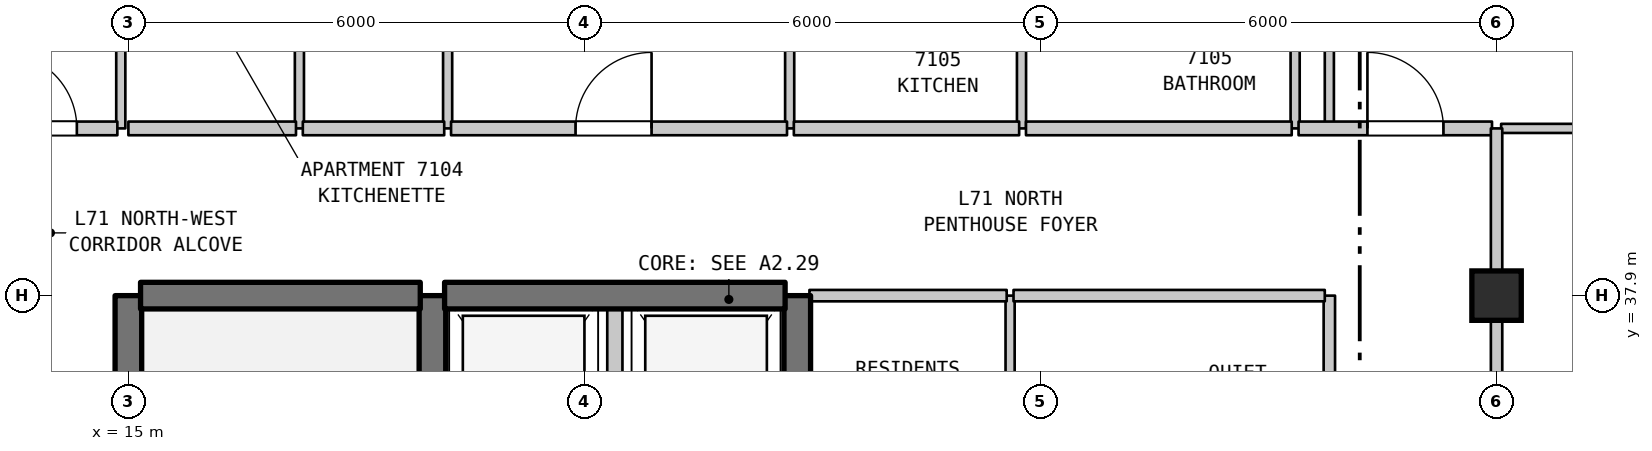
"""IFC4 building model, lengths in metres.
Left out: names, types, materials, properties, quantities, classifications, styles, units other than length and angle.
Written with IfcOpenShell. Run it as: python <this file> out.ifc"""

import sys

from ifc_helpers import new_model, si_unit, direction, frame, frame_2d, origin, origin_2d, place, context, subcontext, project, spatial, rectangle, extrude, element, fill, save


model = new_model("IFC4")
c1 = context("Model", 3, precision=1e-05, world=origin(), true_north=direction((0.0, 1.0)))
c2 = subcontext(c1, "Body", "Model", "MODEL_VIEW")
j1 = project(units=[si_unit("LENGTHUNIT", "METRE"), si_unit("PLANEANGLEUNIT", "RADIAN")], contexts=[c1])
p1 = place(None, origin())
s1 = spatial("IfcSite", under=j1, at=p1, CompositionType="ELEMENT")
p2 = place(p1, origin())
s2 = spatial("IfcBuilding", under=s1, at=p2, CompositionType="ELEMENT")
p3 = place(p2, frame((0.0, 0.0, 284.3)))
s3 = spatial("IfcBuildingStorey", under=s2, at=p3, CompositionType="ELEMENT", Elevation=284.3)
p4 = place(p3, frame((33.0, 37.9, 0.0), z_axis=(0.0, 0.0, 1.0), x_axis=(1.0, 0.0, 0.0)))
e1 = element("IfcColumn", 1, at=p4, inside=s3, PredefinedType="COLUMN", context=c2, shape_type="SweptSolid", body=[
    extrude(rectangle(XDim=0.65, YDim=0.65, at=origin_2d()), origin(), (0.0, 0.0, 1.0), 3.7),
])
p5 = place(p3, frame((14.9, 40.1, 0.0), z_axis=(0.0, 0.0, 1.0), x_axis=(0.0, 1.0, 0.0)))
e2 = element("IfcWall", 2, at=p5, inside=s3, PredefinedType="PARTITIONING", context=c2, shape_type="SweptSolid", body=[
    extrude(rectangle(XDim=3.2, YDim=0.12, at=frame_2d((1.6, 0.0))), origin(), (0.0, 0.0, 1.0), 3.39),
])
p6 = place(p5, frame((1.15, 0.0, 0.0)))
e3 = element("IfcOpeningElement", 3, at=p6, cuts=e2, PredefinedType="OPENING", context=c2, shape_type="SweptSolid", body=[
    extrude(rectangle(XDim=0.9, YDim=2.15, at=frame_2d((0.45, 1.075))), frame((0.0, 0.07, 0.0), z_axis=(0.0, -1.0, 0.0), x_axis=(1.0, 0.0, 0.0)), (0.0, 0.0, 1.0), 0.14),
])
p7 = place(p3, frame((15.0, 31.1, 0.0), z_axis=(0.0, 0.0, 1.0), x_axis=(0.0, 1.0, 0.0)))
e4 = element("IfcWall", 4, at=p7, inside=s3, PredefinedType="SHEAR", context=c2, shape_type="SweptSolid", body=[
    extrude(rectangle(XDim=6.8, YDim=0.35, at=frame_2d((3.4, 0.0))), origin(), (0.0, 0.0, 1.0), 3.39),
])
p8 = place(p3, frame((17.25, 40.1, 0.0), z_axis=(0.0, 0.0, 1.0), x_axis=(0.0, 1.0, 0.0)))
e5 = element("IfcWall", 5, at=p8, inside=s3, PredefinedType="PARTITIONING", context=c2, shape_type="SweptSolid", body=[
    extrude(rectangle(XDim=3.2, YDim=0.12, at=frame_2d((1.6, 0.0))), origin(), (0.0, 0.0, 1.0), 3.39),
])
p9 = place(p3, frame((19.0, 35.0, 0.0), z_axis=(0.0, 0.0, 1.0), x_axis=(0.0, 1.0, 0.0)))
e6 = element("IfcWall", 6, at=p9, inside=s3, PredefinedType="SHEAR", context=c2, shape_type="SweptSolid", body=[
    extrude(rectangle(XDim=2.9, YDim=0.35, at=frame_2d((1.45, 0.0))), origin(), (0.0, 0.0, 1.0), 3.39),
])
p10 = place(p3, frame((19.2, 40.1, 0.0), z_axis=(0.0, 0.0, 1.0), x_axis=(0.0, 1.0, 0.0)))
e7 = element("IfcWall", 7, at=p10, inside=s3, PredefinedType="PARTITIONING", context=c2, shape_type="SweptSolid", body=[
    extrude(rectangle(XDim=13.79, YDim=0.12, at=frame_2d((6.895, 0.0))), origin(), (0.0, 0.0, 1.0), 3.39),
])
p11 = place(p3, frame((21.4, 35.0, 0.0), z_axis=(0.0, 0.0, 1.0), x_axis=(0.0, 1.0, 0.0)))
e8 = element("IfcWall", 8, at=p11, inside=s3, PredefinedType="STANDARD", context=c2, shape_type="SweptSolid", body=[
    extrude(rectangle(XDim=2.9, YDim=0.2, at=frame_2d((1.45, 0.0))), origin(), (0.0, 0.0, 1.0), 3.39),
])
p12 = place(p3, frame((23.7, 40.1, 0.0), z_axis=(0.0, 0.0, 1.0), x_axis=(0.0, 1.0, 0.0)))
e9 = element("IfcWall", 9, at=p12, inside=s3, PredefinedType="PARTITIONING", context=c2, shape_type="SweptSolid", body=[
    extrude(rectangle(XDim=2.3, YDim=0.12, at=frame_2d((1.15, 0.0))), origin(), (0.0, 0.0, 1.0), 3.39),
])
p13 = place(p3, frame((23.8, 35.0, 0.0), z_axis=(0.0, 0.0, 1.0), x_axis=(0.0, 1.0, 0.0)))
e10 = element("IfcWall", 10, at=p13, inside=s3, PredefinedType="SHEAR", context=c2, shape_type="SweptSolid", body=[
    extrude(rectangle(XDim=2.9, YDim=0.35, at=frame_2d((1.45, 0.0))), origin(), (0.0, 0.0, 1.0), 3.39),
])
p14 = place(p3, frame((26.6, 35.0, 0.0), z_axis=(0.0, 0.0, 1.0), x_axis=(0.0, 1.0, 0.0)))
e11 = element("IfcWall", 11, at=p14, inside=s3, PredefinedType="PARTITIONING", context=c2, shape_type="SweptSolid", body=[
    extrude(rectangle(XDim=2.9, YDim=0.12, at=frame_2d((1.45, 0.0))), origin(), (0.0, 0.0, 1.0), 3.39),
])
for number, where, z_axis, x_axis in (
    (12, (26.75, 40.1, 0.0), (0.0, 0.0, 1.0), (0.0, 1.0, 0.0)),
    (13, (30.35, 40.1, 0.0), (0.0, 0.0, 1.0), (0.0, 1.0, 0.0)),
):
    element("IfcWall", number, at=place(p3, frame(where, z_axis=z_axis, x_axis=x_axis)), inside=s3, PredefinedType="PARTITIONING", context=c2, shape_type="SweptSolid", body=[
        extrude(rectangle(XDim=2.3, YDim=0.12, at=frame_2d((1.15, 0.0))), origin(), (0.0, 0.0, 1.0), 3.39),
    ])
p15 = place(p3, frame((30.8, 35.0, 0.0), z_axis=(0.0, 0.0, 1.0), x_axis=(0.0, 1.0, 0.0)))
e14 = element("IfcWall", 14, at=p15, inside=s3, PredefinedType="STANDARD", context=c2, shape_type="SweptSolid", body=[
    extrude(rectangle(XDim=2.9, YDim=0.15, at=frame_2d((1.45, 0.0))), origin(), (0.0, 0.0, 1.0), 3.39),
])
p16 = place(p3, frame((30.8, 40.1, 0.0), z_axis=(0.0, 0.0, 1.0), x_axis=(0.0, 1.0, 0.0)))
e15 = element("IfcWall", 15, at=p16, inside=s3, PredefinedType="PARTITIONING", context=c2, shape_type="SweptSolid", body=[
    extrude(rectangle(XDim=13.79, YDim=0.12, at=frame_2d((6.895, 0.0))), origin(), (0.0, 0.0, 1.0), 3.39),
])
p17 = place(p3, frame((15.16, 37.9, 0.0), z_axis=(0.0, 0.0, 1.0), x_axis=(1.0, 0.0, 0.0)))
e16 = element("IfcWall", 16, at=p17, inside=s3, PredefinedType="SHEAR", context=c2, shape_type="SweptSolid", body=[
    extrude(rectangle(XDim=3.68, YDim=0.35, at=frame_2d((1.84, 0.0))), origin(), (0.0, 0.0, 1.0), 3.39),
])
p18 = place(p3, frame((19.16, 37.9, 0.0), z_axis=(0.0, 0.0, 1.0), x_axis=(1.0, 0.0, 0.0)))
e17 = element("IfcWall", 17, at=p18, inside=s3, PredefinedType="SHEAR", context=c2, shape_type="SweptSolid", body=[
    extrude(rectangle(XDim=4.48, YDim=0.35, at=frame_2d((2.24, 0.0))), origin(), (0.0, 0.0, 1.0), 3.39),
])
p19 = place(p3, frame((23.96, 37.9, 0.0), z_axis=(0.0, 0.0, 1.0), x_axis=(1.0, 0.0, 0.0)))
e18 = element("IfcWall", 18, at=p19, inside=s3, PredefinedType="STANDARD", context=c2, shape_type="SweptSolid", body=[
    extrude(rectangle(XDim=2.595, YDim=0.15, at=frame_2d((1.297, 0.0))), origin(), (0.0, 0.0, 1.0), 2.89),
])
p20 = place(p3, frame((26.645, 37.9, 0.0), z_axis=(0.0, 0.0, 1.0), x_axis=(1.0, 0.0, 0.0)))
e19 = element("IfcWall", 19, at=p20, inside=s3, PredefinedType="STANDARD", context=c2, shape_type="SweptSolid", body=[
    extrude(rectangle(XDim=4.095, YDim=0.15, at=frame_2d((2.047, 0.0))), origin(), (0.0, 0.0, 1.0), 2.89),
])
p21 = place(p3, frame((12.975, 40.1, 0.0), z_axis=(0.0, 0.0, 1.0), x_axis=(1.0, 0.0, 0.0)))
e20 = element("IfcWall", 20, at=p21, inside=s3, PredefinedType="STANDARD", context=c2, shape_type="SweptSolid", body=[
    extrude(rectangle(XDim=1.88, YDim=0.18, at=frame_2d((0.94, 0.0))), origin(), (0.0, 0.0, 1.0), 3.39),
])
p22 = place(p21, frame((0.347, 0.0, 0.0)))
e21 = element("IfcOpeningElement", 21, at=p22, cuts=e20, PredefinedType="OPENING", context=c2, shape_type="SweptSolid", body=[
    extrude(rectangle(XDim=1.0, YDim=2.15, at=frame_2d((0.5, 1.075))), frame((0.0, 0.1, 0.0), z_axis=(0.0, -1.0, 0.0), x_axis=(1.0, 0.0, 0.0)), (0.0, 0.0, 1.0), 0.2),
])
p23 = place(p3, frame((15.0, 40.1, 0.0), z_axis=(0.0, 0.0, 1.0), x_axis=(1.0, 0.0, 0.0)))
e22 = element("IfcWall", 22, at=p23, inside=s3, PredefinedType="STANDARD", context=c2, shape_type="SweptSolid", body=[
    extrude(rectangle(XDim=2.205, YDim=0.18, at=frame_2d((1.103, 0.0))), origin(), (0.0, 0.0, 1.0), 3.39),
])
p24 = place(p3, frame((17.295, 40.1, 0.0), z_axis=(0.0, 0.0, 1.0), x_axis=(1.0, 0.0, 0.0)))
e23 = element("IfcWall", 23, at=p24, inside=s3, PredefinedType="STANDARD", context=c2, shape_type="SweptSolid", body=[
    extrude(rectangle(XDim=1.86, YDim=0.18, at=frame_2d((0.93, 0.0))), origin(), (0.0, 0.0, 1.0), 3.39),
])
p25 = place(p3, frame((19.245, 40.1, 0.0), z_axis=(0.0, 0.0, 1.0), x_axis=(1.0, 0.0, 0.0)))
e24 = element("IfcWall", 24, at=p25, inside=s3, PredefinedType="STANDARD", context=c2, shape_type="SweptSolid", body=[
    extrude(rectangle(XDim=4.42, YDim=0.18, at=frame_2d((2.21, 0.0))), origin(), (0.0, 0.0, 1.0), 3.39),
])
p26 = place(p25, frame((1.638, 0.0, 0.0)))
e25 = element("IfcOpeningElement", 25, at=p26, cuts=e24, PredefinedType="OPENING", context=c2, shape_type="SweptSolid", body=[
    extrude(rectangle(XDim=1.0, YDim=2.15, at=frame_2d((0.5, 1.075))), frame((0.0, 0.1, 0.0), z_axis=(0.0, -1.0, 0.0), x_axis=(1.0, 0.0, 0.0)), (0.0, 0.0, 1.0), 0.2),
])
p27 = place(p3, frame((23.755, 40.1, 0.0), z_axis=(0.0, 0.0, 1.0), x_axis=(1.0, 0.0, 0.0)))
e26 = element("IfcWall", 26, at=p27, inside=s3, PredefinedType="STANDARD", context=c2, shape_type="SweptSolid", body=[
    extrude(rectangle(XDim=2.964, YDim=0.18, at=frame_2d((1.482, 0.0))), origin(), (0.0, 0.0, 1.0), 3.39),
])
p28 = place(p3, frame((26.809, 40.1, 0.0), z_axis=(0.0, 0.0, 1.0), x_axis=(1.0, 0.0, 0.0)))
e27 = element("IfcWall", 27, at=p28, inside=s3, PredefinedType="STANDARD", context=c2, shape_type="SweptSolid", body=[
    extrude(rectangle(XDim=3.496, YDim=0.18, at=frame_2d((1.748, 0.0))), origin(), (0.0, 0.0, 1.0), 3.39),
])
p29 = place(p3, frame((30.395, 40.1, 0.0), z_axis=(0.0, 0.0, 1.0), x_axis=(1.0, 0.0, 0.0)))
e28 = element("IfcWall", 28, at=p29, inside=s3, PredefinedType="STANDARD", context=c2, shape_type="SweptSolid", body=[
    extrude(rectangle(XDim=2.545, YDim=0.18, at=frame_2d((1.272, 0.0))), origin(), (0.0, 0.0, 1.0), 3.39),
])
p30 = place(p29, frame((0.906, 0.0, 0.0)))
e29 = element("IfcOpeningElement", 29, at=p30, cuts=e28, PredefinedType="OPENING", context=c2, shape_type="SweptSolid", body=[
    extrude(rectangle(XDim=1.0, YDim=2.15, at=frame_2d((0.5, 1.075))), frame((0.0, 0.1, 0.0), z_axis=(0.0, -1.0, 0.0), x_axis=(1.0, 0.0, 0.0)), (0.0, 0.0, 1.0), 0.2),
])
p31 = place(p3, frame((33.06, 40.1, 0.0), z_axis=(0.0, 0.0, 1.0), x_axis=(1.0, 0.0, 0.0)))
e30 = element("IfcWall", 30, at=p31, inside=s3, PredefinedType="PARTITIONING", context=c2, shape_type="SweptSolid", body=[
    extrude(rectangle(XDim=2.075, YDim=0.12, at=frame_2d((1.038, 0.0))), origin(), (0.0, 0.0, 1.0), 3.39),
])
p32 = place(p3, frame((33.0, 27.9, 0.0), z_axis=(0.0, 0.0, 1.0), x_axis=(0.0, 1.0, 0.0)))
e31 = element("IfcWall", 31, at=p32, inside=s3, PredefinedType="STANDARD", context=c2, shape_type="SweptSolid", body=[
    extrude(rectangle(XDim=10.0, YDim=0.15, at=frame_2d((5.0, 0.0))), origin(), (0.0, 0.0, 1.0), 2.89),
])
p33 = place(p32, frame((1.4, 0.0, 0.0)))
e32 = element("IfcOpeningElement", 32, at=p33, cuts=e31, PredefinedType="OPENING", context=c2, shape_type="SweptSolid", body=[
    extrude(rectangle(XDim=1.0, YDim=2.15, at=frame_2d((0.5, 1.075))), frame((0.0, 0.085, 0.0), z_axis=(0.0, -1.0, 0.0), x_axis=(1.0, 0.0, 0.0)), (0.0, 0.0, 1.0), 0.17),
])
p34 = place(p3, frame((33.0, 37.9, 0.0), z_axis=(0.0, 0.0, 1.0), x_axis=(0.0, 1.0, 0.0)))
e33 = element("IfcWall", 33, at=p34, inside=s3, PredefinedType="STANDARD", context=c2, shape_type="SweptSolid", body=[
    extrude(rectangle(XDim=2.2, YDim=0.15, at=frame_2d((1.1, 0.0))), origin(), (0.0, 0.0, 1.0), 2.79),
])
p35 = place(p22, origin())
e34 = element("IfcDoor", 34, at=p35, inside=s3, OperationType="SINGLE_SWING_LEFT", PredefinedType="DOOR", context=c2, shape_type="SweptSolid", body=[
    extrude(rectangle(XDim=1.0, YDim=2.15, at=frame_2d((0.5, 1.075))), frame((0.0, 0.025, 0.0), z_axis=(0.0, -1.0, 0.0), x_axis=(1.0, 0.0, 0.0)), (0.0, 0.0, 1.0), 0.05),
])
fill(e21, e34)
p36 = place(p26, origin())
e35 = element("IfcDoor", 35, at=p36, inside=s3, OperationType="SINGLE_SWING_RIGHT", PredefinedType="DOOR", context=c2, shape_type="SweptSolid", body=[
    extrude(rectangle(XDim=1.0, YDim=2.15, at=frame_2d((0.5, 1.075))), frame((0.0, 0.025, 0.0), z_axis=(0.0, -1.0, 0.0), x_axis=(1.0, 0.0, 0.0)), (0.0, 0.0, 1.0), 0.05),
])
fill(e25, e35)
p37 = place(p30, origin())
e36 = element("IfcDoor", 36, at=p37, inside=s3, OperationType="SINGLE_SWING_LEFT", PredefinedType="DOOR", context=c2, shape_type="SweptSolid", body=[
    extrude(rectangle(XDim=1.0, YDim=2.15, at=frame_2d((0.5, 1.075))), frame((0.0, 0.025, 0.0), z_axis=(0.0, -1.0, 0.0), x_axis=(1.0, 0.0, 0.0)), (0.0, 0.0, 1.0), 0.05),
])
fill(e29, e36)
save(model, sys.argv[1])
